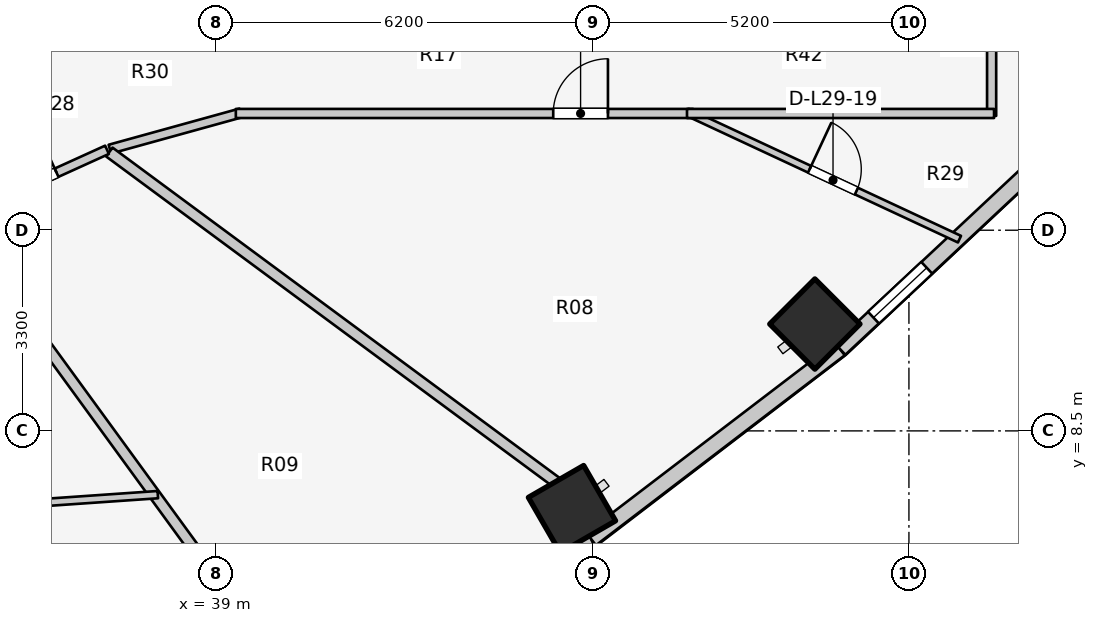
"""IFC4 building model, lengths in metres.
Left out: names, types, materials, properties, quantities, classifications, styles, units other than length and angle.
Written with IfcOpenShell. Run it as: python <this file> out.ifc"""

import sys

from ifc_helpers import new_model, si_unit, direction, frame, frame_2d, origin, origin_2d, place, context, subcontext, project, spatial, rectangle, extrude, element, fill, save


model = new_model("IFC4")
c1 = context("Model", 3, precision=1e-05, world=origin(), true_north=direction((0.0, 1.0)))
c2 = subcontext(c1, "Body", "Model", "MODEL_VIEW")
j1 = project(units=[si_unit("LENGTHUNIT", "METRE"), si_unit("PLANEANGLEUNIT", "RADIAN")], contexts=[c1])
p1 = place(None, origin())
s1 = spatial("IfcSite", under=j1, at=p1, CompositionType="ELEMENT")
p2 = place(p1, origin())
s2 = spatial("IfcBuilding", under=s1, at=p2, CompositionType="ELEMENT")
p3 = place(p2, frame((0.0, 0.0, 98.0)))
s3 = spatial("IfcBuildingStorey", under=s2, at=p3, CompositionType="ELEMENT", Elevation=98.0)
for number, where, z_axis, x_axis in (
    (1, (44.858, 7.214, 0.0), (0.0, 0.0, 1.0), (0.5, -0.866, 0.0)),
    (2, (48.853, 10.257, 0.0), (0.0, 0.0, 1.0), (0.707, -0.707, 0.0)),
):
    element("IfcColumn", number, at=place(p3, frame(where, z_axis=z_axis, x_axis=x_axis)), inside=s3, PredefinedType="COLUMN", context=c2, shape_type="SweptSolid", body=[
        extrude(rectangle(XDim=1.05, YDim=1.05, at=origin_2d()), origin(), (0.0, 0.0, 1.0), 3.1),
    ])
p4 = place(p3, frame((39.816, 4.349, 0.0), z_axis=(0.0, 0.0, 1.0), x_axis=(0.914336605747, 0.404955023911, 0.0)))
e3 = element("IfcWall", 3, at=p4, inside=s3, PredefinedType="STANDARD", context=c2, shape_type="SweptSolid", body=[
    extrude(rectangle(XDim=5.859, YDim=0.26, at=frame_2d((2.929, 0.0))), origin(), (0.0, 0.0, 1.0), 2.85),
])
p5 = place(p4, frame((1.729, 0.0, 0.75)))
e4 = element("IfcOpeningElement", 4, at=p5, cuts=e3, PredefinedType="OPENING", context=c2, shape_type="SweptSolid", body=[
    extrude(rectangle(XDim=2.4, YDim=1.7, at=frame_2d((1.2, 0.85))), frame((0.0, 0.14, 0.0), z_axis=(0.0, -1.0, 0.0), x_axis=(1.0, 0.0, 0.0)), (0.0, 0.0, 1.0), 0.28),
])
p6 = place(p3, frame((45.173, 6.722, 0.0), z_axis=(0.0, 0.0, 1.0), x_axis=(0.794809810864, 0.606858603427, 0.0)))
e5 = element("IfcWall", 5, at=p6, inside=s3, PredefinedType="STANDARD", context=c2, shape_type="SweptSolid", body=[
    extrude(rectangle(XDim=5.149, YDim=0.26, at=frame_2d((2.575, 0.0))), origin(), (0.0, 0.0, 1.0), 2.85),
])
p7 = place(p3, frame((49.266, 9.847, 0.0), z_axis=(0.0, 0.0, 1.0), x_axis=(0.730162452258, 0.68327358599, 0.0)))
e6 = element("IfcWall", 6, at=p7, inside=s3, PredefinedType="STANDARD", context=c2, shape_type="SweptSolid", body=[
    extrude(rectangle(XDim=4.868, YDim=0.26, at=frame_2d((2.434, 0.0))), origin(), (0.0, 0.0, 1.0), 2.85),
])
p8 = place(p7, frame((0.755, 0.0, 0.75)))
e7 = element("IfcOpeningElement", 7, at=p8, cuts=e6, PredefinedType="OPENING", context=c2, shape_type="SweptSolid", body=[
    extrude(rectangle(XDim=1.2, YDim=1.5, at=frame_2d((0.6, 0.75))), frame((0.0, 0.14, 0.0), z_axis=(0.0, -1.0, 0.0), x_axis=(1.0, 0.0, 0.0)), (0.0, 0.0, 1.0), 0.28),
])
p9 = place(p3, frame((51.76, 13.68, 0.0), z_axis=(0.0, 0.0, 1.0), x_axis=(0.0, 1.0, 0.0)))
e8 = element("IfcWall", 8, at=p9, inside=s3, PredefinedType="PARTITIONING", context=c2, shape_type="SweptSolid", body=[
    extrude(rectangle(XDim=3.535, YDim=0.15, at=frame_2d((1.768, 0.0))), origin(), (0.0, 0.0, 1.0), 2.855),
])
p10 = place(p3, frame((46.755, 13.741, 0.0), z_axis=(0.0, 0.0, 1.0), x_axis=(0.906244997559, -0.422752888102, 0.0)))
e9 = element("IfcWall", 9, at=p10, inside=s3, PredefinedType="MOVABLE", context=c2, shape_type="SweptSolid", body=[
    extrude(rectangle(XDim=4.94, YDim=0.12, at=frame_2d((2.47, 0.0))), origin(), (0.0, 0.0, 1.0), 2.142),
])
p11 = place(p10, frame((2.22, 0.0, 0.0)))
e10 = element("IfcOpeningElement", 10, at=p11, cuts=e9, PredefinedType="OPENING", context=c2, shape_type="SweptSolid", body=[
    extrude(rectangle(XDim=0.85, YDim=2.05, at=frame_2d((0.425, 1.025))), frame((0.0, 0.07, 0.0), z_axis=(0.0, -1.0, 0.0), x_axis=(1.0, 0.0, 0.0)), (0.0, 0.0, 1.0), 0.14),
])
p12 = place(p3, frame((37.258, 13.133, 0.0), z_axis=(0.0, 0.0, 1.0), x_axis=(0.963833843713, 0.266503886865, 0.0)))
e11 = element("IfcWall", 11, at=p12, inside=s3, PredefinedType="PARTITIONING", context=c2, shape_type="SweptSolid", body=[
    extrude(rectangle(XDim=2.232, YDim=0.15, at=frame_2d((1.116, 0.0))), origin(), (0.0, 0.0, 1.0), 2.272),
])
p13 = place(p3, frame((39.33, 13.72, 0.0), z_axis=(0.0, 0.0, 1.0), x_axis=(1.0, 0.0, 0.0)))
e12 = element("IfcWall", 12, at=p13, inside=s3, PredefinedType="PARTITIONING", context=c2, shape_type="SweptSolid", body=[
    extrude(rectangle(XDim=7.52, YDim=0.15, at=frame_2d((3.76, 0.0))), origin(), (0.0, 0.0, 1.0), 2.272),
])
p14 = place(p13, frame((5.22, 0.0, 0.0)))
e13 = element("IfcOpeningElement", 13, at=p14, cuts=e12, PredefinedType="OPENING", context=c2, shape_type="SweptSolid", body=[
    extrude(rectangle(XDim=0.9, YDim=2.1, at=frame_2d((0.45, 1.05))), frame((0.0, 0.085, 0.0), z_axis=(0.0, -1.0, 0.0), x_axis=(1.0, 0.0, 0.0)), (0.0, 0.0, 1.0), 0.17),
])
p15 = place(p3, frame((46.75, 13.72, 0.0), z_axis=(0.0, 0.0, 1.0), x_axis=(1.0, 0.0, 0.0)))
e14 = element("IfcWall", 14, at=p15, inside=s3, PredefinedType="PARTITIONING", context=c2, shape_type="SweptSolid", body=[
    extrude(rectangle(XDim=5.05, YDim=0.15, at=frame_2d((2.525, 0.0))), origin(), (0.0, 0.0, 1.0), 2.142),
])
p16 = place(p3, frame((34.727, 11.934, 0.0), z_axis=(0.0, 0.0, 1.0), x_axis=(0.589042211476, -0.808102266486, 0.0)))
e15 = element("IfcWall", 15, at=p16, inside=s3, PredefinedType="PARTITIONING", context=c2, shape_type="SweptSolid", body=[
    extrude(rectangle(XDim=8.101, YDim=0.18, at=frame_2d((4.051, 0.0))), origin(), (0.0, 0.0, 1.0), 2.272),
])
p17 = place(p3, frame((37.249, 13.086, 0.0), z_axis=(0.0, 0.0, 1.0), x_axis=(0.80430981394, -0.594210167533, 0.0)))
e16 = element("IfcWall", 16, at=p17, inside=s3, PredefinedType="PARTITIONING", context=c2, shape_type="SweptSolid", body=[
    extrude(rectangle(XDim=9.146, YDim=0.18, at=frame_2d((4.573, 0.0))), origin(), (0.0, 0.0, 1.0), 2.272),
])
p18 = place(p3, frame((31.99, 7.032, 0.0), z_axis=(0.0, 0.0, 1.0), x_axis=(0.997605327057, 0.06916365684, 0.0)))
e17 = element("IfcWall", 17, at=p18, inside=s3, PredefinedType="MOVABLE", context=c2, shape_type="SweptSolid", body=[
    extrude(rectangle(XDim=6.072, YDim=0.12, at=frame_2d((3.036, 0.0))), origin(), (0.0, 0.0, 1.0), 2.272),
])
p19 = place(p3, frame((34.687, 11.977, 0.0), z_axis=(0.0, 0.0, 1.0), x_axis=(0.910568469686, 0.41335827319, 0.0)))
e18 = element("IfcWall", 18, at=p19, inside=s3, PredefinedType="PARTITIONING", context=c2, shape_type="SweptSolid", body=[
    extrude(rectangle(XDim=2.772, YDim=0.15, at=frame_2d((1.386, 0.0))), origin(), (0.0, 0.0, 1.0), 2.272),
])
p20 = place(p19, frame((0.911, 0.0, 0.0)))
e19 = element("IfcOpeningElement", 19, at=p20, cuts=e18, PredefinedType="OPENING", context=c2, shape_type="SweptSolid", body=[
    extrude(rectangle(XDim=0.95, YDim=2.1, at=frame_2d((0.475, 1.05))), frame((0.0, 0.085, 0.0), z_axis=(0.0, -1.0, 0.0), x_axis=(1.0, 0.0, 0.0)), (0.0, 0.0, 1.0), 0.17),
])
p21 = place(p8, origin())
e20 = element("IfcWindow", 20, at=p21, inside=s3, PartitioningType="SINGLE_PANEL", PredefinedType="WINDOW", context=c2, shape_type="SweptSolid", body=[
    extrude(rectangle(XDim=1.2, YDim=1.5, at=frame_2d((0.6, 0.75))), frame((0.0, 0.03, 0.0), z_axis=(0.0, -1.0, 0.0), x_axis=(1.0, 0.0, 0.0)), (0.0, 0.0, 1.0), 0.06),
])
fill(e7, e20)
p22 = place(p11, origin())
e21 = element("IfcDoor", 21, at=p22, inside=s3, OperationType="SINGLE_SWING_LEFT", PredefinedType="DOOR", context=c2, shape_type="SweptSolid", body=[
    extrude(rectangle(XDim=0.85, YDim=2.05, at=frame_2d((0.425, 1.025))), frame((0.0, 0.025, 0.0), z_axis=(0.0, -1.0, 0.0), x_axis=(1.0, 0.0, 0.0)), (0.0, 0.0, 1.0), 0.05),
])
fill(e10, e21)
p23 = place(p14, origin())
e22 = element("IfcDoor", 22, at=p23, inside=s3, OperationType="SINGLE_SWING_RIGHT", PredefinedType="DOOR", context=c2, shape_type="SweptSolid", body=[
    extrude(rectangle(XDim=0.9, YDim=2.1, at=frame_2d((0.45, 1.05))), frame((0.0, 0.025, 0.0), z_axis=(0.0, -1.0, 0.0), x_axis=(1.0, 0.0, 0.0)), (0.0, 0.0, 1.0), 0.05),
])
fill(e13, e22)
p24 = place(p20, origin())
e23 = element("IfcDoor", 23, at=p24, inside=s3, OperationType="SINGLE_SWING_RIGHT", PredefinedType="DOOR", context=c2, shape_type="SweptSolid", body=[
    extrude(rectangle(XDim=0.95, YDim=2.1, at=frame_2d((0.475, 1.05))), frame((0.0, 0.025, 0.0), z_axis=(0.0, -1.0, 0.0), x_axis=(1.0, 0.0, 0.0)), (0.0, 0.0, 1.0), 0.05),
])
fill(e19, e23)
save(model, sys.argv[1])
